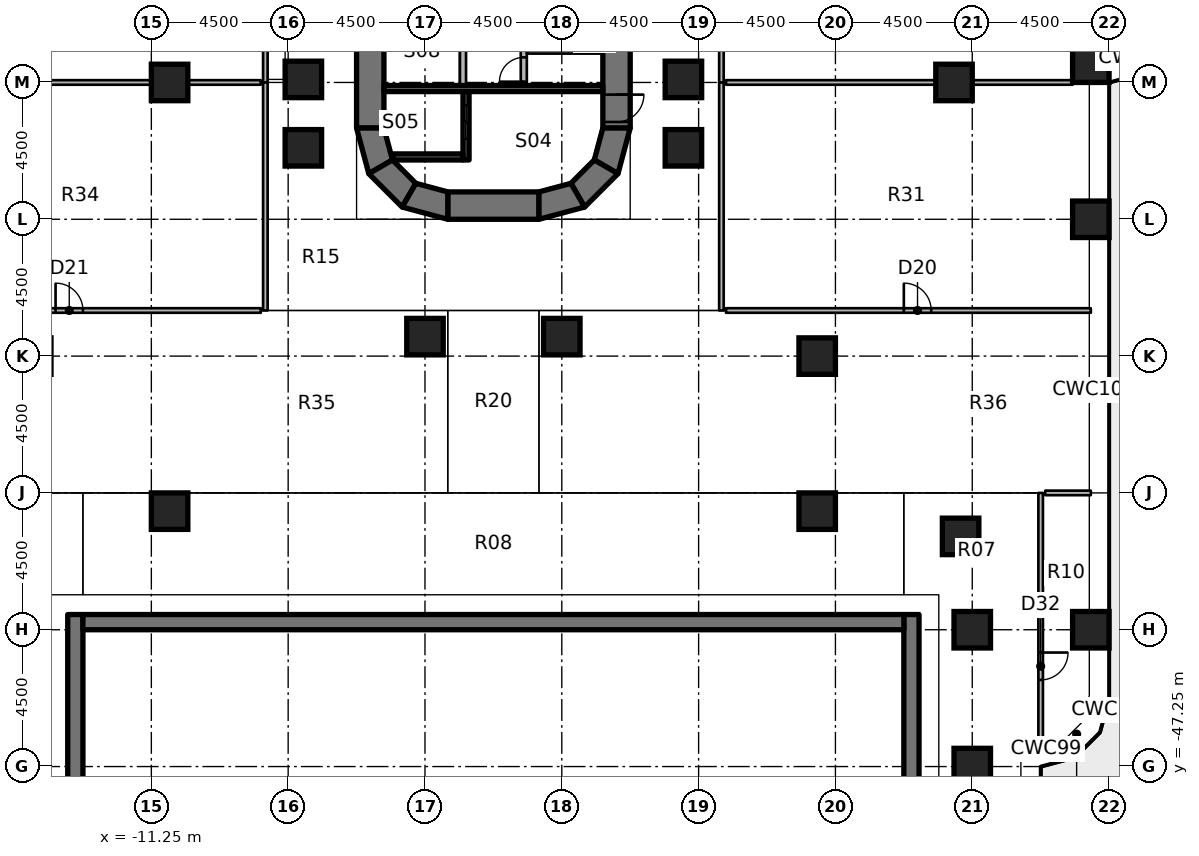
"""IFC4 building model, lengths in metres.
Left out: names, types, materials, properties, quantities, classifications, styles, units other than length and angle.
Written with IfcOpenShell. Run it as: python <this file> out.ifc"""

import sys

from ifc_helpers import new_model, si_unit, direction, frame, frame_2d, origin, origin_2d, place, context, subcontext, project, spatial, polyline, rectangle, outline, extrude, element, fill, save


model = new_model("IFC4")
c1 = context("Model", 3, precision=1e-05, world=origin(), true_north=direction((0.0, 1.0)))
c2 = subcontext(c1, "Body", "Model", "MODEL_VIEW")
j1 = project(units=[si_unit("LENGTHUNIT", "METRE"), si_unit("PLANEANGLEUNIT", "RADIAN")], contexts=[c1])
p1 = place(None, origin())
s1 = spatial("IfcSite", under=j1, at=p1, CompositionType="ELEMENT")
p2 = place(p1, origin())
s2 = spatial("IfcBuilding", under=s1, at=p2, CompositionType="ELEMENT")
p3 = place(p2, frame((0.0, 0.0, 12.0)))
s3 = spatial("IfcBuildingStorey", under=s2, at=p3, CompositionType="ELEMENT", Elevation=12.0)
for number, where, z_axis, x_axis in (
    (1, (-10.65, -38.85, 0.0), (0.0, 0.0, 1.0), (1.0, 0.0, 0.0)),
    (2, (-10.65, -24.75, 0.0), (0.0, 0.0, 1.0), (1.0, 0.0, 0.0)),
    (3, (-6.25, -26.9, 0.0), (0.0, 0.0, 1.0), (1.0, 0.0, 0.0)),
    (4, (-6.25, -24.65, 0.0), (0.0, 0.0, 1.0), (1.0, 0.0, 0.0)),
    (5, (-2.25, -33.11, 0.0), (0.0, 0.0, 1.0), (1.0, 0.0, 0.0)),
    (6, (2.25, -33.11, 0.0), (0.0, 0.0, 1.0), (1.0, 0.0, 0.0)),
    (7, (6.25, -26.9, 0.0), (0.0, 0.0, 1.0), (1.0, 0.0, 0.0)),
    (8, (6.25, -24.65, 0.0), (0.0, 0.0, 1.0), (1.0, 0.0, 0.0)),
    (9, (10.65, -38.85, 0.0), (0.0, 0.0, 1.0), (1.0, 0.0, 0.0)),
    (10, (10.65, -33.75, 0.0), (0.0, 0.0, 1.0), (1.0, 0.0, 0.0)),
    (11, (15.75, -47.25, 0.0), (0.0, 0.0, 1.0), (1.0, 0.0, 0.0)),
    (12, (15.75, -42.75, 0.0), (0.0, 0.0, 1.0), (1.0, 0.0, 0.0)),
    (13, (15.367, -39.68, 0.0), (0.0, 0.0, 1.0), (1.0, 0.0, 0.0)),
    (14, (15.15, -24.75, 0.0), (0.0, 0.0, 1.0), (1.0, 0.0, 0.0)),
    (15, (19.65, -42.75, 0.0), (0.0, 0.0, 1.0), (1.0, 0.0, 0.0)),
    (16, (19.65, -29.25, 0.0), (0.0, 0.0, 1.0), (1.0, 0.0, 0.0)),
    (17, (19.65, -24.15, 0.0), (0.0, 0.0, 1.0), (1.0, 0.0, 0.0)),
):
    element("IfcColumn", number, at=place(p3, frame(where, z_axis=z_axis, x_axis=x_axis)), inside=s3, PredefinedType="COLUMN", context=c2, shape_type="SweptSolid", body=[
        extrude(rectangle(XDim=1.2, YDim=1.2, at=origin_2d()), origin(), (0.0, 0.0, 1.0), 4.55),
    ])
p4 = place(p3, frame((-4.05, -11.25, 0.0), z_axis=(0.0, 0.0, 1.0), x_axis=(0.0, -1.0, 0.0)))
e18 = element("IfcWall", 18, at=p4, inside=s3, PredefinedType="SHEAR", context=c2, shape_type="SweptSolid", body=[
    extrude(rectangle(XDim=15.0, YDim=0.9, at=frame_2d((7.5, 0.0))), origin(), (0.0, 0.0, 1.0), 5.0),
])
p5 = place(p4, frame((7.15, 0.0, 0.0)))
e19 = element("IfcOpeningElement", 19, at=p5, cuts=e18, PredefinedType="OPENING", context=c2, shape_type="SweptSolid", body=[
    extrude(rectangle(XDim=1.5, YDim=2.3, at=frame_2d((0.75, 1.15))), frame((0.0, 0.46, 0.0), z_axis=(0.0, -1.0, 0.0), x_axis=(1.0, 0.0, 0.0)), (0.0, 0.0, 1.0), 0.92),
])
p6 = place(p4, frame((5.55, 0.0, 0.0)))
e20 = element("IfcOpeningElement", 20, at=p6, cuts=e18, PredefinedType="OPENING", context=c2, shape_type="SweptSolid", body=[
    extrude(rectangle(XDim=1.2, YDim=2.1, at=frame_2d((0.6, 1.05))), frame((0.0, 0.46, 0.0), z_axis=(0.0, -1.0, 0.0), x_axis=(1.0, 0.0, 0.0)), (0.0, 0.0, 1.0), 0.92),
])
p7 = place(p3, frame((4.05, -11.25, 0.0), z_axis=(0.0, 0.0, 1.0), x_axis=(0.0, -1.0, 0.0)))
e21 = element("IfcWall", 21, at=p7, inside=s3, PredefinedType="SHEAR", context=c2, shape_type="SweptSolid", body=[
    extrude(rectangle(XDim=15.0, YDim=0.9, at=frame_2d((7.5, 0.0))), origin(), (0.0, 0.0, 1.0), 5.0),
])
p8 = place(p7, frame((7.15, 0.0, 0.0)))
e22 = element("IfcOpeningElement", 22, at=p8, cuts=e21, PredefinedType="OPENING", context=c2, shape_type="SweptSolid", body=[
    extrude(rectangle(XDim=1.5, YDim=2.3, at=frame_2d((0.75, 1.15))), frame((0.0, 0.46, 0.0), z_axis=(0.0, -1.0, 0.0), x_axis=(1.0, 0.0, 0.0)), (0.0, 0.0, 1.0), 0.92),
])
p9 = place(p7, frame((13.9, 0.0, 0.0)))
e23 = element("IfcOpeningElement", 23, at=p9, cuts=e21, PredefinedType="OPENING", context=c2, shape_type="SweptSolid", body=[
    extrude(rectangle(XDim=0.9, YDim=2.1, at=frame_2d((0.45, 1.05))), frame((0.0, 0.46, 0.0), z_axis=(0.0, -1.0, 0.0), x_axis=(1.0, 0.0, 0.0)), (0.0, 0.0, 1.0), 0.92),
])
p10 = place(p7, frame((1.15, 0.0, 0.0)))
e24 = element("IfcOpeningElement", 24, at=p10, cuts=e21, PredefinedType="OPENING", context=c2, shape_type="SweptSolid", body=[
    extrude(rectangle(XDim=1.2, YDim=2.1, at=frame_2d((0.6, 1.05))), frame((0.0, 0.46, 0.0), z_axis=(0.0, -1.0, 0.0), x_axis=(1.0, 0.0, 0.0)), (0.0, 0.0, 1.0), 0.92),
])
p11 = place(p3, frame((-1.5, -28.8, 0.0), z_axis=(0.0, 0.0, 1.0), x_axis=(1.0, 0.0, 0.0)))
e25 = element("IfcWall", 25, at=p11, inside=s3, PredefinedType="SHEAR", context=c2, shape_type="SweptSolid", body=[
    extrude(rectangle(XDim=3.0, YDim=0.9, at=frame_2d((1.5, 0.0))), origin(), (0.0, 0.0, 1.0), 5.0),
])
p12 = place(p3, origin())
e26 = element("IfcWall", 26, at=p12, inside=s3, PredefinedType="SHEAR", context=c2, shape_type="SweptSolid", body=[
    extrude(outline(polyline([(-4.5, -26.25), (-4.098, -27.75), (-3.319, -27.3), (-3.6, -26.25), (-4.5, -26.25)])), origin(), (0.0, 0.0, 1.0), 5.0),
])
p13 = place(p3, origin())
e27 = element("IfcWall", 27, at=p13, inside=s3, PredefinedType="SHEAR", context=c2, shape_type="SweptSolid", body=[
    extrude(outline(polyline([(-4.098, -27.75), (-3.0, -28.848), (-2.55, -28.069), (-3.319, -27.3), (-4.098, -27.75)])), origin(), (0.0, 0.0, 1.0), 5.0),
])
p14 = place(p3, origin())
e28 = element("IfcWall", 28, at=p14, inside=s3, PredefinedType="SHEAR", context=c2, shape_type="SweptSolid", body=[
    extrude(outline(polyline([(-3.0, -28.848), (-1.5, -29.25), (-1.5, -28.35), (-2.55, -28.069), (-3.0, -28.848)])), origin(), (0.0, 0.0, 1.0), 5.0),
])
p15 = place(p3, origin())
e29 = element("IfcWall", 29, at=p15, inside=s3, PredefinedType="SHEAR", context=c2, shape_type="SweptSolid", body=[
    extrude(outline(polyline([(4.5, -26.25), (4.098, -27.75), (3.319, -27.3), (3.6, -26.25), (4.5, -26.25)])), origin(), (0.0, 0.0, 1.0), 5.0),
])
p16 = place(p3, origin())
e30 = element("IfcWall", 30, at=p16, inside=s3, PredefinedType="SHEAR", context=c2, shape_type="SweptSolid", body=[
    extrude(outline(polyline([(4.098, -27.75), (3.0, -28.848), (2.55, -28.069), (3.319, -27.3), (4.098, -27.75)])), origin(), (0.0, 0.0, 1.0), 5.0),
])
p17 = place(p3, origin())
e31 = element("IfcWall", 31, at=p17, inside=s3, PredefinedType="SHEAR", context=c2, shape_type="SweptSolid", body=[
    extrude(outline(polyline([(3.0, -28.848), (1.5, -29.25), (1.5, -28.35), (2.55, -28.069), (3.0, -28.848)])), origin(), (0.0, 0.0, 1.0), 5.0),
])
for number, where, z_axis, x_axis in (
    (32, (-13.75, -63.5, 0.0), (0.0, 0.0, 1.0), (0.0, 1.0, 0.0)),
    (33, (13.75, -63.5, 0.0), (0.0, 0.0, 1.0), (0.0, 1.0, 0.0)),
):
    element("IfcWall", number, at=place(p3, frame(where, z_axis=z_axis, x_axis=x_axis)), inside=s3, PredefinedType="SOLIDWALL", context=c2, shape_type="SweptSolid", body=[
        extrude(rectangle(XDim=21.25, YDim=0.5, at=frame_2d((10.625, 0.0))), origin(), (0.0, 0.0, 1.0), 5.0),
    ])
p18 = place(p3, frame((-13.5, -42.5, 0.0), z_axis=(0.0, 0.0, 1.0), x_axis=(1.0, 0.0, 0.0)))
e34 = element("IfcWall", 34, at=p18, inside=s3, PredefinedType="SOLIDWALL", context=c2, shape_type="SweptSolid", body=[
    extrude(rectangle(XDim=27.0, YDim=0.5, at=frame_2d((13.5, 0.0))), origin(), (0.0, 0.0, 1.0), 5.0),
])
p19 = place(p3, frame((3.6, -24.95, 0.0), z_axis=(0.0, 0.0, 1.0), x_axis=(-1.0, 0.0, 0.0)))
e35 = element("IfcWall", 35, at=p19, inside=s3, PredefinedType="SHEAR", context=c2, shape_type="SweptSolid", body=[
    extrude(rectangle(XDim=7.2, YDim=0.2, at=frame_2d((3.6, 0.0))), origin(), (0.0, 0.0, 1.0), 4.55),
])
p20 = place(p3, frame((-0.9, -27.3, 0.0), z_axis=(0.0, 0.0, 1.0), x_axis=(0.0, 1.0, 0.0)))
e36 = element("IfcWall", 36, at=p20, inside=s3, PredefinedType="SHEAR", context=c2, shape_type="SweptSolid", body=[
    extrude(rectangle(XDim=2.25, YDim=0.2, at=frame_2d((1.125, 0.0))), origin(), (0.0, 0.0, 1.0), 4.55),
])
p21 = place(p20, frame((0.7, 0.0, 0.0)))
e37 = element("IfcOpeningElement", 37, at=p21, cuts=e36, PredefinedType="OPENING", context=c2, shape_type="SweptSolid", body=[
    extrude(rectangle(XDim=1.1, YDim=2.3, at=frame_2d((0.55, 1.15))), frame((0.0, 0.11, 0.0), z_axis=(0.0, -1.0, 0.0), x_axis=(1.0, 0.0, 0.0)), (0.0, 0.0, 1.0), 0.22),
])
p22 = place(p3, origin())
e38 = element("IfcWall", 38, at=p22, inside=s3, PredefinedType="SHEAR", context=c2, shape_type="SweptSolid", body=[
    extrude(outline(polyline([(-1.0, -27.1), (-3.341, -27.1), (-3.291, -27.284), (-3.275, -27.3), (-1.0, -27.3), (-1.0, -27.1)])), origin(), (0.0, 0.0, 1.0), 4.55),
])
p23 = place(p3, frame((1.0, -24.85, 0.0), z_axis=(0.0, 0.0, 1.0), x_axis=(0.0, 1.0, 0.0)))
e39 = element("IfcWall", 39, at=p23, inside=s3, PredefinedType="PARTITIONING", context=c2, shape_type="SweptSolid", body=[
    extrude(rectangle(XDim=4.6, YDim=0.2, at=frame_2d((2.3, 0.0))), origin(), (0.0, 0.0, 1.0), 4.55),
])
p24 = place(p23, frame((0.125, 0.0, 0.0)))
e40 = element("IfcOpeningElement", 40, at=p24, cuts=e39, PredefinedType="OPENING", context=c2, shape_type="SweptSolid", body=[
    extrude(rectangle(XDim=0.8, YDim=2.1, at=frame_2d((0.4, 1.05))), frame((0.0, 0.11, 0.0), z_axis=(0.0, -1.0, 0.0), x_axis=(1.0, 0.0, 0.0)), (0.0, 0.0, 1.0), 0.22),
])
p25 = place(p23, frame((2.425, 0.0, 0.0)))
e41 = element("IfcOpeningElement", 41, at=p25, cuts=e39, PredefinedType="OPENING", context=c2, shape_type="SweptSolid", body=[
    extrude(rectangle(XDim=0.9, YDim=2.1, at=frame_2d((0.45, 1.05))), frame((0.0, 0.11, 0.0), z_axis=(0.0, -1.0, 0.0), x_axis=(1.0, 0.0, 0.0)), (0.0, 0.0, 1.0), 0.22),
])
p26 = place(p3, frame((-1.0, -24.85, 0.0), z_axis=(0.0, 0.0, 1.0), x_axis=(0.0, 1.0, 0.0)))
e42 = element("IfcWall", 42, at=p26, inside=s3, PredefinedType="PARTITIONING", context=c2, shape_type="SweptSolid", body=[
    extrude(rectangle(XDim=4.6, YDim=0.2, at=frame_2d((2.3, 0.0))), origin(), (0.0, 0.0, 1.0), 4.55),
])
p27 = place(p3, frame((3.6, -23.75, 0.0), z_axis=(0.0, 0.0, 1.0), x_axis=(-1.0, 0.0, 0.0)))
e43 = element("IfcWall", 43, at=p27, inside=s3, PredefinedType="PARTITIONING", context=c2, shape_type="SweptSolid", body=[
    extrude(rectangle(XDim=2.5, YDim=0.1, at=frame_2d((1.25, 0.0))), origin(), (0.0, 0.0, 1.0), 4.55),
])
p28 = place(p3, frame((18.0, -38.25, 0.0), z_axis=(0.0, 0.0, 1.0), x_axis=(0.0, -1.0, 0.0)))
e44 = element("IfcWall", 44, at=p28, inside=s3, PredefinedType="PARTITIONING", context=c2, shape_type="SweptSolid", body=[
    extrude(rectangle(XDim=8.38, YDim=0.15, at=frame_2d((4.19, 0.0))), origin(), (0.0, 0.0, 1.0), 4.55),
])
p29 = place(p28, frame((5.25, 0.0, 0.0)))
e45 = element("IfcOpeningElement", 45, at=p29, cuts=e44, PredefinedType="OPENING", context=c2, shape_type="SweptSolid", body=[
    extrude(rectangle(XDim=0.9, YDim=2.1, at=frame_2d((0.45, 1.05))), frame((0.0, 0.085, 0.0), z_axis=(0.0, -1.0, 0.0), x_axis=(1.0, 0.0, 0.0)), (0.0, 0.0, 1.0), 0.17),
])
p30 = place(p3, frame((18.15, -38.25, 0.0), z_axis=(0.0, 0.0, 1.0), x_axis=(1.0, 0.0, 0.0)))
e46 = element("IfcWall", 46, at=p30, inside=s3, PredefinedType="PARTITIONING", context=c2, shape_type="SweptSolid", body=[
    extrude(rectangle(XDim=1.5, YDim=0.15, at=frame_2d((0.75, 0.0))), origin(), (0.0, 0.0, 1.0), 4.55),
])
p31 = place(p3, frame((7.5, -8.25, 0.0), z_axis=(0.0, 0.0, 1.0), x_axis=(0.0, -1.0, 0.0)))
e47 = element("IfcWall", 47, at=p31, inside=s3, PredefinedType="PARTITIONING", context=c2, shape_type="SweptSolid", body=[
    extrude(rectangle(XDim=16.5, YDim=0.15, at=frame_2d((8.25, 0.0))), origin(), (0.0, 0.0, 1.0), 4.55),
])
p32 = place(p3, frame((7.5, -24.75, 0.0), z_axis=(0.0, 0.0, 1.0), x_axis=(0.0, -1.0, 0.0)))
e48 = element("IfcWall", 48, at=p32, inside=s3, PredefinedType="PARTITIONING", context=c2, shape_type="SweptSolid", body=[
    extrude(rectangle(XDim=7.5, YDim=0.15, at=frame_2d((3.75, 0.0))), origin(), (0.0, 0.0, 1.0), 4.55),
])
p33 = place(p3, frame((-7.5, -24.75, 0.0), z_axis=(0.0, 0.0, 1.0), x_axis=(0.0, 1.0, 0.0)))
e49 = element("IfcWall", 49, at=p33, inside=s3, PredefinedType="PARTITIONING", context=c2, shape_type="SweptSolid", body=[
    extrude(rectangle(XDim=16.5, YDim=0.15, at=frame_2d((8.25, 0.0))), origin(), (0.0, 0.0, 1.0), 4.55),
])
p34 = place(p33, frame((7.25, 0.0, 0.0)))
e50 = element("IfcOpeningElement", 50, at=p34, cuts=e49, PredefinedType="OPENING", context=c2, shape_type="SweptSolid", body=[
    extrude(rectangle(XDim=1.0, YDim=2.1, at=frame_2d((0.5, 1.05))), frame((0.0, 0.085, 0.0), z_axis=(0.0, -1.0, 0.0), x_axis=(1.0, 0.0, 0.0)), (0.0, 0.0, 1.0), 0.17),
])
p35 = place(p3, frame((-7.5, -32.25, 0.0), z_axis=(0.0, 0.0, 1.0), x_axis=(0.0, 1.0, 0.0)))
e51 = element("IfcWall", 51, at=p35, inside=s3, PredefinedType="PARTITIONING", context=c2, shape_type="SweptSolid", body=[
    extrude(rectangle(XDim=7.5, YDim=0.15, at=frame_2d((3.75, 0.0))), origin(), (0.0, 0.0, 1.0), 4.55),
])
p36 = place(p3, frame((19.05, -24.75, 0.0), z_axis=(0.0, 0.0, 1.0), x_axis=(-1.0, 0.0, 0.0)))
e52 = element("IfcWall", 52, at=p36, inside=s3, PredefinedType="PARTITIONING", context=c2, shape_type="SweptSolid", body=[
    extrude(rectangle(XDim=3.3, YDim=0.15, at=frame_2d((1.65, 0.0))), origin(), (0.0, 0.0, 1.0), 4.55),
])
p37 = place(p3, frame((14.55, -24.75, 0.0), z_axis=(0.0, 0.0, 1.0), x_axis=(-1.0, 0.0, 0.0)))
e53 = element("IfcWall", 53, at=p37, inside=s3, PredefinedType="PARTITIONING", context=c2, shape_type="SweptSolid", body=[
    extrude(rectangle(XDim=6.9, YDim=0.15, at=frame_2d((3.45, 0.0))), origin(), (0.0, 0.0, 1.0), 4.55),
])
p38 = place(p3, frame((7.65, -32.25, 0.0), z_axis=(0.0, 0.0, 1.0), x_axis=(1.0, 0.0, 0.0)))
e54 = element("IfcWall", 54, at=p38, inside=s3, PredefinedType="PARTITIONING", context=c2, shape_type="SweptSolid", body=[
    extrude(rectangle(XDim=12.0, YDim=0.15, at=frame_2d((6.0, 0.0))), origin(), (0.0, 0.0, 1.0), 4.55),
])
p39 = place(p38, frame((5.85, 0.0, 0.0)))
e55 = element("IfcOpeningElement", 55, at=p39, cuts=e54, PredefinedType="OPENING", context=c2, shape_type="SweptSolid", body=[
    extrude(rectangle(XDim=0.9, YDim=2.1, at=frame_2d((0.45, 1.05))), frame((0.0, 0.085, 0.0), z_axis=(0.0, -1.0, 0.0), x_axis=(1.0, 0.0, 0.0)), (0.0, 0.0, 1.0), 0.17),
])
p40 = place(p3, frame((-7.65, -24.75, 0.0), z_axis=(0.0, 0.0, 1.0), x_axis=(-1.0, 0.0, 0.0)))
e56 = element("IfcWall", 56, at=p40, inside=s3, PredefinedType="PARTITIONING", context=c2, shape_type="SweptSolid", body=[
    extrude(rectangle(XDim=2.4, YDim=0.15, at=frame_2d((1.2, 0.0))), origin(), (0.0, 0.0, 1.0), 4.55),
])
p41 = place(p3, frame((-11.25, -24.75, 0.0), z_axis=(0.0, 0.0, 1.0), x_axis=(-1.0, 0.0, 0.0)))
e57 = element("IfcWall", 57, at=p41, inside=s3, PredefinedType="PARTITIONING", context=c2, shape_type="SweptSolid", body=[
    extrude(rectangle(XDim=7.8, YDim=0.15, at=frame_2d((3.9, 0.0))), origin(), (0.0, 0.0, 1.0), 4.55),
])
p42 = place(p3, frame((-19.65, -32.25, 0.0), z_axis=(0.0, 0.0, 1.0), x_axis=(1.0, 0.0, 0.0)))
e58 = element("IfcWall", 58, at=p42, inside=s3, PredefinedType="PARTITIONING", context=c2, shape_type="SweptSolid", body=[
    extrude(rectangle(XDim=12.0, YDim=0.15, at=frame_2d((6.0, 0.0))), origin(), (0.0, 0.0, 1.0), 4.55),
])
p43 = place(p42, frame((5.25, 0.0, 0.0)))
e59 = element("IfcOpeningElement", 59, at=p43, cuts=e58, PredefinedType="OPENING", context=c2, shape_type="SweptSolid", body=[
    extrude(rectangle(XDim=0.9, YDim=2.1, at=frame_2d((0.45, 1.05))), frame((0.0, 0.085, 0.0), z_axis=(0.0, -1.0, 0.0), x_axis=(1.0, 0.0, 0.0)), (0.0, 0.0, 1.0), 0.17),
])
p44 = place(p9, origin())
e60 = element("IfcDoor", 60, at=p44, inside=s3, OperationType="SINGLE_SWING_RIGHT", PredefinedType="DOOR", context=c2, shape_type="SweptSolid", body=[
    extrude(rectangle(XDim=0.9, YDim=2.1, at=frame_2d((0.45, 1.05))), frame((0.0, 0.025, 0.0), z_axis=(0.0, -1.0, 0.0), x_axis=(1.0, 0.0, 0.0)), (0.0, 0.0, 1.0), 0.05),
])
fill(e23, e60)
p45 = place(p21, origin())
e61 = element("IfcDoor", 61, at=p45, inside=s3, OperationType="DOUBLE_DOOR_SLIDING", PredefinedType="DOOR", context=c2, shape_type="SweptSolid", body=[
    extrude(rectangle(XDim=1.1, YDim=2.3, at=frame_2d((0.55, 1.15))), frame((0.0, 0.025, 0.0), z_axis=(0.0, -1.0, 0.0), x_axis=(1.0, 0.0, 0.0)), (0.0, 0.0, 1.0), 0.05),
])
fill(e37, e61)
p46 = place(p24, origin())
e62 = element("IfcDoor", 62, at=p46, inside=s3, OperationType="SINGLE_SWING_RIGHT", PredefinedType="DOOR", context=c2, shape_type="SweptSolid", body=[
    extrude(rectangle(XDim=0.8, YDim=2.1, at=frame_2d((0.4, 1.05))), frame((0.0, 0.025, 0.0), z_axis=(0.0, -1.0, 0.0), x_axis=(1.0, 0.0, 0.0)), (0.0, 0.0, 1.0), 0.05),
])
fill(e40, e62)
p47 = place(p29, origin())
e63 = element("IfcDoor", 63, at=p47, inside=s3, OperationType="SINGLE_SWING_LEFT", PredefinedType="DOOR", context=c2, shape_type="SweptSolid", body=[
    extrude(rectangle(XDim=0.9, YDim=2.1, at=frame_2d((0.45, 1.05))), frame((0.0, 0.025, 0.0), z_axis=(0.0, -1.0, 0.0), x_axis=(1.0, 0.0, 0.0)), (0.0, 0.0, 1.0), 0.05),
])
fill(e45, e63)
p48 = place(p39, origin())
e64 = element("IfcDoor", 64, at=p48, inside=s3, OperationType="SINGLE_SWING_LEFT", PredefinedType="DOOR", context=c2, shape_type="SweptSolid", body=[
    extrude(rectangle(XDim=0.9, YDim=2.1, at=frame_2d((0.45, 1.05))), frame((0.0, 0.025, 0.0), z_axis=(0.0, -1.0, 0.0), x_axis=(1.0, 0.0, 0.0)), (0.0, 0.0, 1.0), 0.05),
])
fill(e55, e64)
p49 = place(p43, origin())
e65 = element("IfcDoor", 65, at=p49, inside=s3, OperationType="SINGLE_SWING_LEFT", PredefinedType="DOOR", context=c2, shape_type="SweptSolid", body=[
    extrude(rectangle(XDim=0.9, YDim=2.1, at=frame_2d((0.45, 1.05))), frame((0.0, 0.025, 0.0), z_axis=(0.0, -1.0, 0.0), x_axis=(1.0, 0.0, 0.0)), (0.0, 0.0, 1.0), 0.05),
])
fill(e59, e65)
save(model, sys.argv[1])
